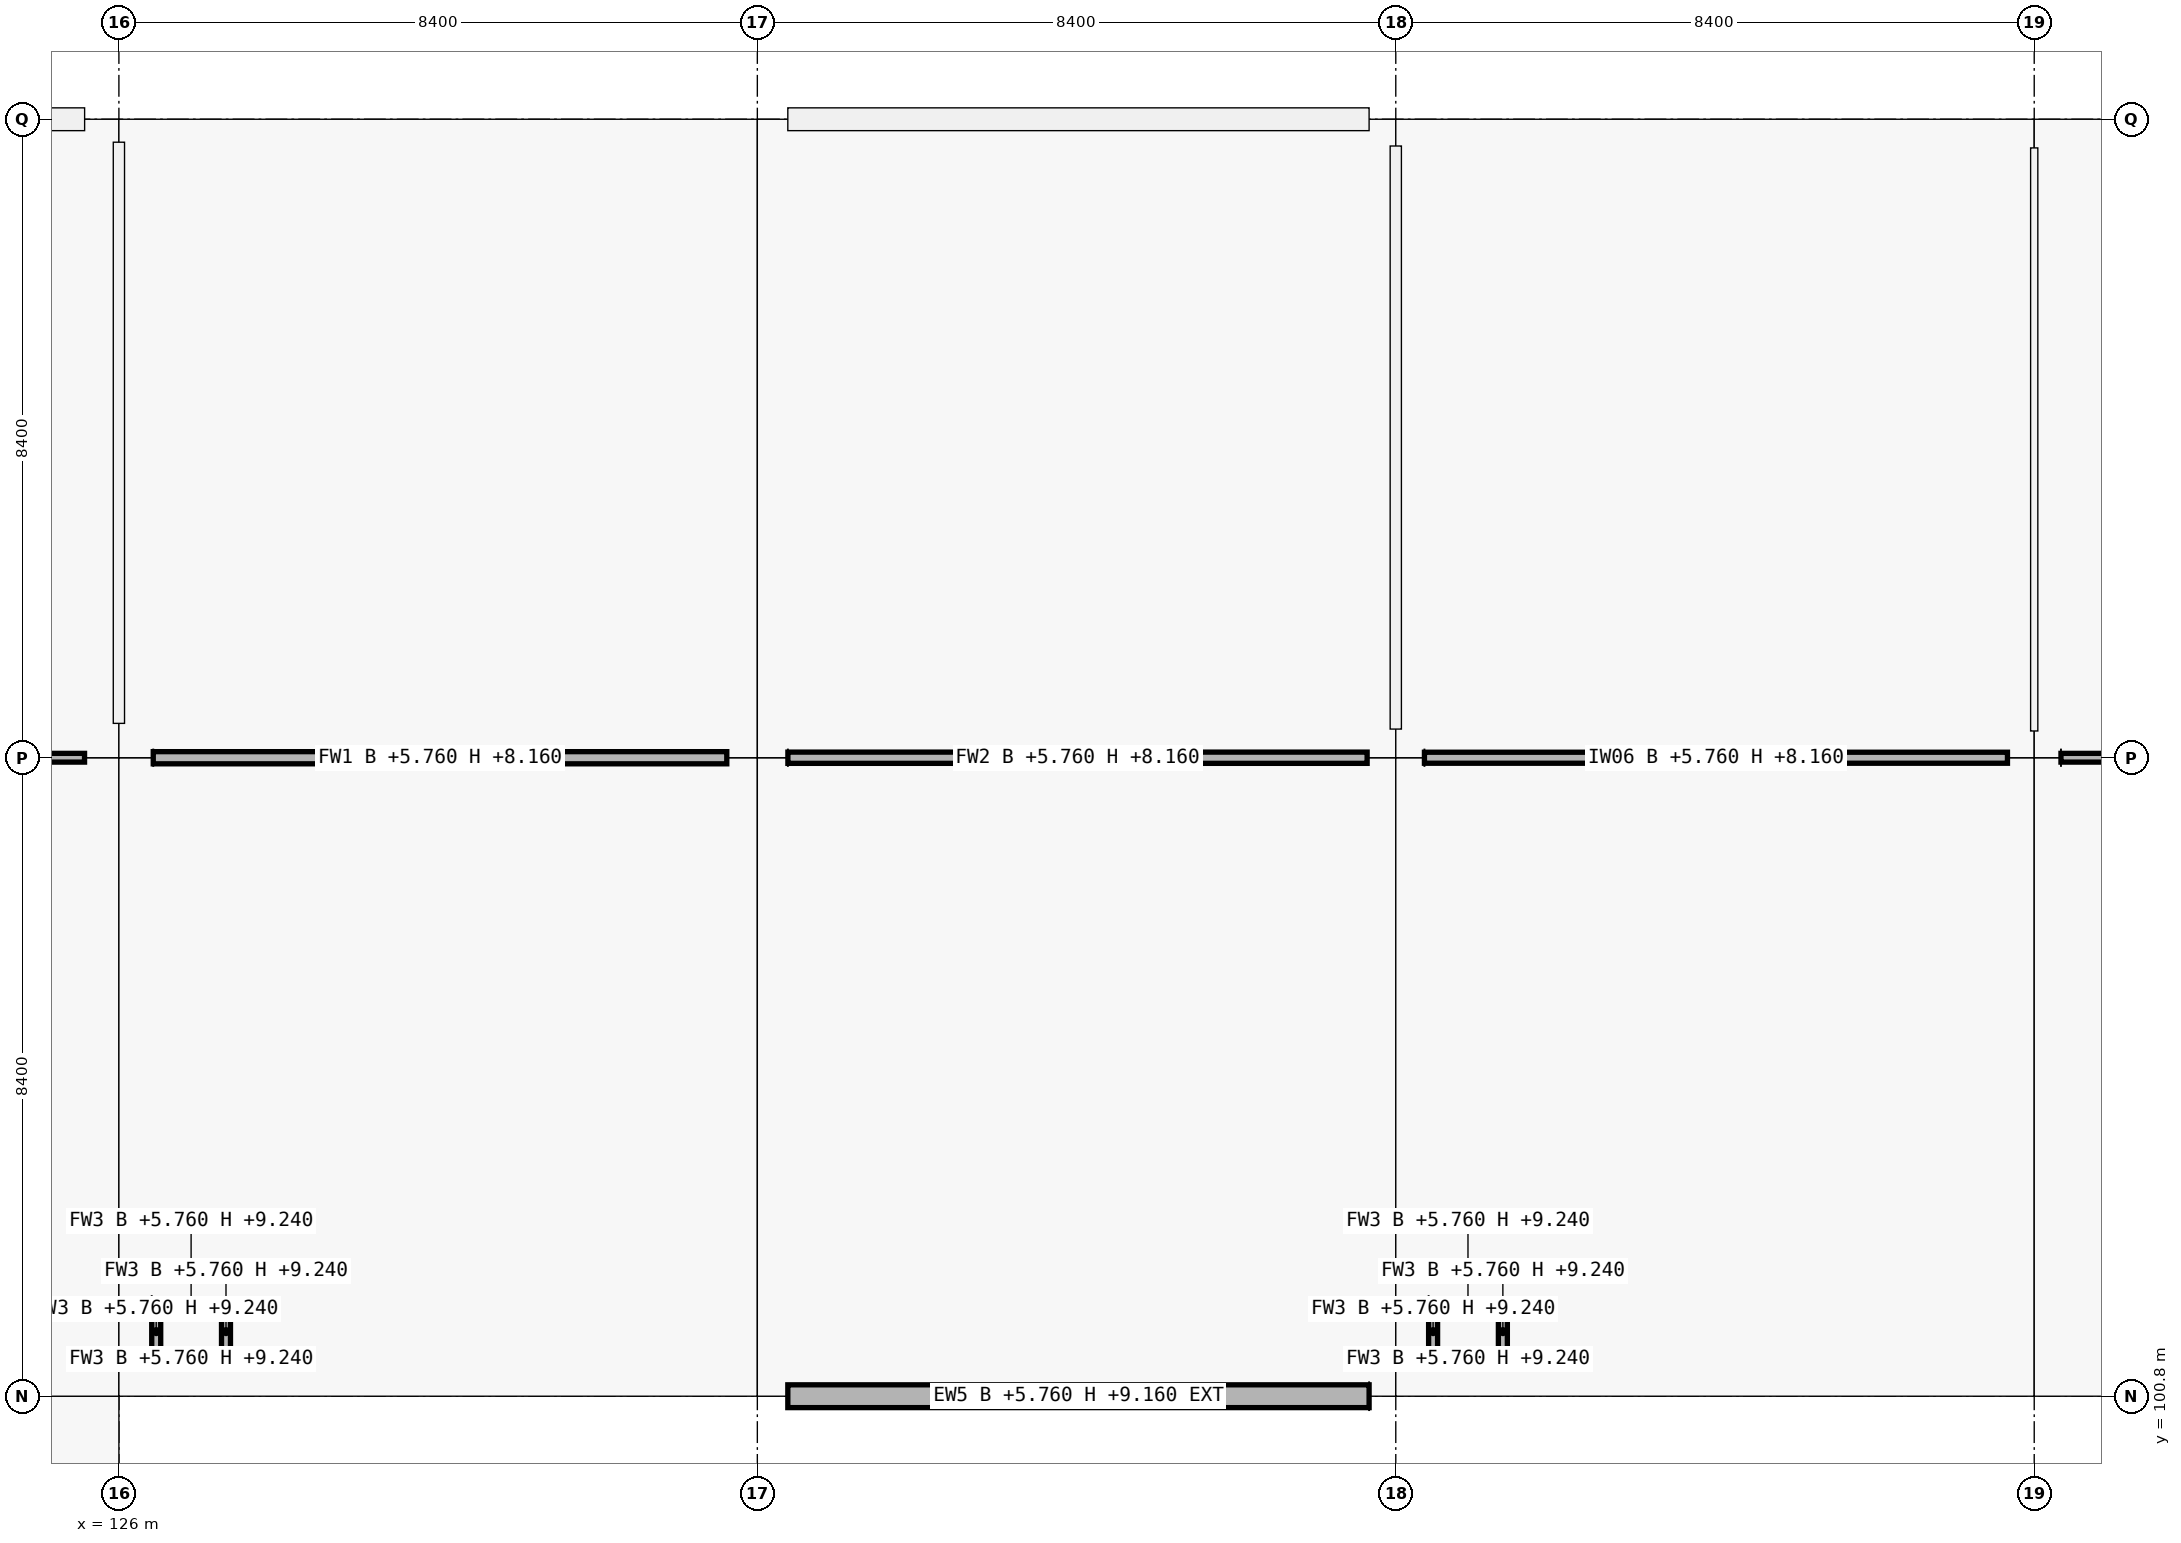
"""IFC4 building model, lengths in metres.
Left out: names, types, materials, properties, quantities, classifications, styles, units other than length and angle.
Written with IfcOpenShell. Run it as: python <this file> out.ifc"""

import sys

from ifc_helpers import new_model, si_unit, direction, frame, frame_2d, origin, origin_2d, place, context, subcontext, project, spatial, rectangle, extrude, element, fill, save


model = new_model("IFC4")
c1 = context("Model", 3, precision=1e-05, world=origin(), true_north=direction((0.0, 1.0)))
c2 = subcontext(c1, "Body", "Model", "MODEL_VIEW")
j1 = project(units=[si_unit("LENGTHUNIT", "METRE"), si_unit("PLANEANGLEUNIT", "RADIAN")], contexts=[c1])
p1 = place(None, origin())
s1 = spatial("IfcSite", under=j1, at=p1, CompositionType="ELEMENT")
p2 = place(p1, origin())
s2 = spatial("IfcBuilding", under=s1, at=p2, CompositionType="ELEMENT")
p3 = place(p2, frame((0.0, 0.0, 5.76)))
s3 = spatial("IfcBuildingStorey", under=s2, at=p3, CompositionType="ELEMENT", Elevation=5.76)
for number, where, z_axis, x_axis in (
    (1, (126.0, 100.8, 0.0), (0.0, 0.0, 1.0), (1.0, 0.0, 0.0)),
    (2, (126.0, 109.2, 0.0), (0.0, 0.0, 1.0), (1.0, 0.0, 0.0)),
):
    element("IfcColumn", number, at=place(p3, frame(where, z_axis=z_axis, x_axis=x_axis)), inside=s3, PredefinedType="COLUMN", context=c2, shape_type="SweptSolid", body=[
        extrude(rectangle(XDim=0.9, YDim=0.9, at=origin_2d()), origin(), (0.0, 0.0, 1.0), 4.5),
    ])
p4 = place(p3, frame((126.0, 117.6, 0.0), z_axis=(0.0, 0.0, 1.0), x_axis=(1.0, 0.0, 0.0)))
e3 = element("IfcColumn", 3, at=p4, inside=s3, PredefinedType="COLUMN", context=c2, shape_type="SweptSolid", body=[
    extrude(rectangle(XDim=0.9, YDim=0.6, at=origin_2d()), origin(), (0.0, 0.0, 1.0), 4.5),
])
for number, where, z_axis, x_axis in (
    (4, (134.4, 100.8, 0.0), (0.0, 0.0, 1.0), (1.0, 0.0, 0.0)),
    (5, (134.4, 109.2, 0.0), (0.0, 0.0, 1.0), (1.0, 0.0, 0.0)),
):
    element("IfcColumn", number, at=place(p3, frame(where, z_axis=z_axis, x_axis=x_axis)), inside=s3, PredefinedType="COLUMN", context=c2, shape_type="SweptSolid", body=[
        extrude(rectangle(XDim=0.8, YDim=0.8, at=origin_2d()), origin(), (0.0, 0.0, 1.0), 4.5),
    ])
p5 = place(p3, frame((134.4, 117.6, 0.0), z_axis=(0.0, 0.0, 1.0), x_axis=(1.0, 0.0, 0.0)))
e6 = element("IfcColumn", 6, at=p5, inside=s3, PredefinedType="COLUMN", context=c2, shape_type="SweptSolid", body=[
    extrude(rectangle(XDim=0.8, YDim=0.55, at=origin_2d()), origin(), (0.0, 0.0, 1.0), 4.5),
])
p6 = place(p3, frame((142.8, 100.8, 0.0), z_axis=(0.0, 0.0, 1.0), x_axis=(1.0, 0.0, 0.0)))
e7 = element("IfcColumn", 7, at=p6, inside=s3, PredefinedType="COLUMN", context=c2, shape_type="SweptSolid", body=[
    extrude(rectangle(XDim=0.7, YDim=0.7, at=origin_2d()), origin(), (0.0, 0.0, 1.0), 4.5),
])
p7 = place(p3, frame((142.8, 109.2, 0.0), z_axis=(0.0, 0.0, 1.0), x_axis=(1.0, 0.0, 0.0)))
e8 = element("IfcColumn", 8, at=p7, inside=s3, PredefinedType="COLUMN", context=c2, shape_type="SweptSolid", body=[
    extrude(rectangle(XDim=0.75, YDim=0.75, at=origin_2d()), origin(), (0.0, 0.0, 1.0), 4.5),
])
p8 = place(p3, frame((142.8, 117.6, 0.0), z_axis=(0.0, 0.0, 1.0), x_axis=(1.0, 0.0, 0.0)))
e9 = element("IfcColumn", 9, at=p8, inside=s3, PredefinedType="COLUMN", context=c2, shape_type="SweptSolid", body=[
    extrude(rectangle(XDim=0.7, YDim=0.7, at=origin_2d()), origin(), (0.0, 0.0, 1.0), 4.5),
])
p9 = place(p3, frame((151.2, 100.8, 0.0), z_axis=(0.0, 0.0, 1.0), x_axis=(1.0, 0.0, 0.0)))
e10 = element("IfcColumn", 10, at=p9, inside=s3, PredefinedType="COLUMN", context=c2, shape_type="SweptSolid", body=[
    extrude(rectangle(XDim=0.75, YDim=0.75, at=origin_2d()), origin(), (0.0, 0.0, 1.0), 4.5),
])
p10 = place(p3, frame((151.2, 109.2, 0.0), z_axis=(0.0, 0.0, 1.0), x_axis=(1.0, 0.0, 0.0)))
e11 = element("IfcColumn", 11, at=p10, inside=s3, PredefinedType="COLUMN", context=c2, shape_type="SweptSolid", body=[
    extrude(rectangle(XDim=0.7, YDim=0.7, at=origin_2d()), origin(), (0.0, 0.0, 1.0), 4.5),
])
p11 = place(p3, frame((151.2, 117.6, 0.0), z_axis=(0.0, 0.0, 1.0), x_axis=(1.0, 0.0, 0.0)))
e12 = element("IfcColumn", 12, at=p11, inside=s3, PredefinedType="COLUMN", context=c2, shape_type="SweptSolid", body=[
    extrude(rectangle(XDim=0.75, YDim=0.75, at=origin_2d()), origin(), (0.0, 0.0, 1.0), 4.5),
])
p12 = place(p3, frame((118.051, 117.6, 0.0), z_axis=(0.0, 0.0, 1.0), x_axis=(1.0, 0.0, 0.0)))
e13 = element("IfcWall", 13, at=p12, inside=s3, PredefinedType="SOLIDWALL", context=c2, shape_type="SweptSolid", body=[
    extrude(rectangle(XDim=7.498, YDim=0.3, at=frame_2d((3.749, 0.0))), origin(), (0.0, 0.0, 1.0), 3.4),
])
p13 = place(p12, frame((2.499, 0.0, 0.9)))
e14 = element("IfcOpeningElement", 14, at=p13, cuts=e13, PredefinedType="OPENING", context=c2, shape_type="SweptSolid", body=[
    extrude(rectangle(XDim=2.5, YDim=1.65, at=frame_2d((1.25, 0.825))), frame((0.0, 0.15, 0.0), z_axis=(0.0, -1.0, 0.0), x_axis=(1.0, 0.0, 0.0)), (0.0, 0.0, 1.0), 0.3),
])
p14 = place(p3, frame((142.449, 100.8, 0.0), z_axis=(0.0, 0.0, 1.0), x_axis=(-1.0, 0.0, 0.0)))
e15 = element("IfcWall", 15, at=p14, inside=s3, PredefinedType="SOLIDWALL", context=c2, shape_type="SweptSolid", body=[
    extrude(rectangle(XDim=7.648, YDim=0.3, at=frame_2d((3.824, 0.0))), origin(), (0.0, 0.0, 1.0), 3.4),
])
p15 = place(p14, frame((2.824, 0.0, 0.9)))
e16 = element("IfcOpeningElement", 16, at=p15, cuts=e15, PredefinedType="OPENING", context=c2, shape_type="SweptSolid", body=[
    extrude(rectangle(XDim=2.0, YDim=2.25, at=frame_2d((1.0, 1.125))), frame((0.0, 0.15, 0.0), z_axis=(0.0, -1.0, 0.0), x_axis=(1.0, 0.0, 0.0)), (0.0, 0.0, 1.0), 0.3),
])
p16 = place(p3, frame((134.801, 117.6, 0.0), z_axis=(0.0, 0.0, 1.0), x_axis=(1.0, 0.0, 0.0)))
e17 = element("IfcWall", 17, at=p16, inside=s3, PredefinedType="SOLIDWALL", context=c2, shape_type="SweptSolid", body=[
    extrude(rectangle(XDim=7.648, YDim=0.3, at=frame_2d((3.824, 0.0))), origin(), (0.0, 0.0, 1.0), 3.4),
])
p17 = place(p16, frame((3.024, 0.0, 0.9)))
e18 = element("IfcOpeningElement", 18, at=p17, cuts=e17, PredefinedType="OPENING", context=c2, shape_type="SweptSolid", body=[
    extrude(rectangle(XDim=1.6, YDim=2.25, at=frame_2d((0.8, 1.125))), frame((0.0, 0.15, 0.0), z_axis=(0.0, -1.0, 0.0), x_axis=(1.0, 0.0, 0.0)), (0.0, 0.0, 1.0), 0.3),
])
for number, where, z_axis, x_axis in (
    (19, (126.432, 101.291, 0.0), (0.0, 0.0, 1.0), (1.0, 0.0, 0.0)),
    (20, (126.432, 102.009, 0.0), (0.0, 0.0, 1.0), (1.0, 0.0, 0.0)),
):
    element("IfcWall", number, at=place(p3, frame(where, z_axis=z_axis, x_axis=x_axis)), inside=s3, PredefinedType="PARTITIONING", context=c2, shape_type="SweptSolid", body=[
        extrude(rectangle(XDim=1.036, YDim=0.118, at=frame_2d((0.518, 0.0))), origin(), (0.0, 0.0, 1.0), 3.48),
    ])
for number, where, z_axis, x_axis in (
    (21, (126.491, 101.35, 0.0), (0.0, 0.0, 1.0), (0.0, 1.0, 0.0)),
    (22, (127.409, 101.35, 0.0), (0.0, 0.0, 1.0), (0.0, 1.0, 0.0)),
):
    element("IfcWall", number, at=place(p3, frame(where, z_axis=z_axis, x_axis=x_axis)), inside=s3, PredefinedType="PARTITIONING", context=c2, shape_type="SweptSolid", body=[
        extrude(rectangle(XDim=0.6, YDim=0.118, at=frame_2d((0.3, 0.0))), origin(), (0.0, 0.0, 1.0), 3.48),
    ])
for number, where, z_axis, x_axis in (
    (23, (143.232, 101.291, 0.0), (0.0, 0.0, 1.0), (1.0, 0.0, 0.0)),
    (24, (143.232, 102.009, 0.0), (0.0, 0.0, 1.0), (1.0, 0.0, 0.0)),
):
    element("IfcWall", number, at=place(p3, frame(where, z_axis=z_axis, x_axis=x_axis)), inside=s3, PredefinedType="PARTITIONING", context=c2, shape_type="SweptSolid", body=[
        extrude(rectangle(XDim=1.036, YDim=0.118, at=frame_2d((0.518, 0.0))), origin(), (0.0, 0.0, 1.0), 3.48),
    ])
for number, where, z_axis, x_axis in (
    (25, (143.291, 101.35, 0.0), (0.0, 0.0, 1.0), (0.0, 1.0, 0.0)),
    (26, (144.209, 101.35, 0.0), (0.0, 0.0, 1.0), (0.0, 1.0, 0.0)),
):
    element("IfcWall", number, at=place(p3, frame(where, z_axis=z_axis, x_axis=x_axis)), inside=s3, PredefinedType="PARTITIONING", context=c2, shape_type="SweptSolid", body=[
        extrude(rectangle(XDim=0.6, YDim=0.118, at=frame_2d((0.3, 0.0))), origin(), (0.0, 0.0, 1.0), 3.48),
    ])
p18 = place(p3, frame((118.052, 109.2, 0.0), z_axis=(0.0, 0.0, 1.0), x_axis=(1.0, 0.0, 0.0)))
e27 = element("IfcWall", 27, at=p18, inside=s3, PredefinedType="PARTITIONING", context=c2, shape_type="SweptSolid", body=[
    extrude(rectangle(XDim=7.496, YDim=0.115, at=frame_2d((3.748, 0.0))), origin(), (0.0, 0.0, 1.0), 2.4),
])
p19 = place(p18, frame((3.248, 0.0, 0.0)))
e28 = element("IfcOpeningElement", 28, at=p19, cuts=e27, PredefinedType="OPENING", context=c2, shape_type="SweptSolid", body=[
    extrude(rectangle(XDim=1.0, YDim=2.2, at=frame_2d((0.5, 1.1))), frame((0.0, 0.058, 0.0), z_axis=(0.0, -1.0, 0.0), x_axis=(1.0, 0.0, 0.0)), (0.0, 0.0, 1.0), 0.115),
])
p20 = place(p3, frame((126.452, 109.2, 0.0), z_axis=(0.0, 0.0, 1.0), x_axis=(1.0, 0.0, 0.0)))
e29 = element("IfcWall", 29, at=p20, inside=s3, PredefinedType="PARTITIONING", context=c2, shape_type="SweptSolid", body=[
    extrude(rectangle(XDim=7.546, YDim=0.16, at=frame_2d((3.773, 0.0))), origin(), (0.0, 0.0, 1.0), 2.4),
])
p21 = place(p20, frame((3.323, 0.0, 0.0)))
e30 = element("IfcOpeningElement", 30, at=p21, cuts=e29, PredefinedType="OPENING", context=c2, shape_type="SweptSolid", body=[
    extrude(rectangle(XDim=0.9, YDim=2.05, at=frame_2d((0.45, 1.025))), frame((0.0, 0.08, 0.0), z_axis=(0.0, -1.0, 0.0), x_axis=(1.0, 0.0, 0.0)), (0.0, 0.0, 1.0), 0.16),
])
p22 = place(p3, frame((134.802, 109.2, 0.0), z_axis=(0.0, 0.0, 1.0), x_axis=(1.0, 0.0, 0.0)))
e31 = element("IfcWall", 31, at=p22, inside=s3, PredefinedType="PARTITIONING", context=c2, shape_type="SweptSolid", body=[
    extrude(rectangle(XDim=7.621, YDim=0.148, at=frame_2d((3.811, 0.0))), origin(), (0.0, 0.0, 1.0), 2.4),
])
p23 = place(p22, frame((3.011, 0.0, 0.0)))
e32 = element("IfcOpeningElement", 32, at=p23, cuts=e31, PredefinedType="OPENING", context=c2, shape_type="SweptSolid", body=[
    extrude(rectangle(XDim=1.6, YDim=2.2, at=frame_2d((0.8, 1.1))), frame((0.0, 0.074, 0.0), z_axis=(0.0, -1.0, 0.0), x_axis=(1.0, 0.0, 0.0)), (0.0, 0.0, 1.0), 0.148),
])
p24 = place(p3, frame((143.177, 109.2, 0.0), z_axis=(0.0, 0.0, 1.0), x_axis=(1.0, 0.0, 0.0)))
e33 = element("IfcWall", 33, at=p24, inside=s3, PredefinedType="PARTITIONING", context=c2, shape_type="SweptSolid", body=[
    extrude(rectangle(XDim=7.671, YDim=0.145, at=frame_2d((3.835, 0.0))), origin(), (0.0, 0.0, 1.0), 2.4),
])
p25 = place(p24, frame((3.376, 0.0, 0.0)))
e34 = element("IfcOpeningElement", 34, at=p25, cuts=e33, PredefinedType="OPENING", context=c2, shape_type="SweptSolid", body=[
    extrude(rectangle(XDim=0.92, YDim=2.15, at=frame_2d((0.46, 1.075))), frame((0.0, 0.073, 0.0), z_axis=(0.0, -1.0, 0.0), x_axis=(1.0, 0.0, 0.0)), (0.0, 0.0, 1.0), 0.145),
])
p26 = place(p3, frame((151.552, 109.2, 0.0), z_axis=(0.0, 0.0, 1.0), x_axis=(1.0, 0.0, 0.0)))
e35 = element("IfcWall", 35, at=p26, inside=s3, PredefinedType="PARTITIONING", context=c2, shape_type="SweptSolid", body=[
    extrude(rectangle(XDim=7.721, YDim=0.115, at=frame_2d((3.86, 0.0))), origin(), (0.0, 0.0, 1.0), 2.4),
])
p27 = place(p26, frame((3.336, 0.0, 0.0)))
e36 = element("IfcOpeningElement", 36, at=p27, cuts=e35, PredefinedType="OPENING", context=c2, shape_type="SweptSolid", body=[
    extrude(rectangle(XDim=1.05, YDim=2.12, at=frame_2d((0.525, 1.06))), frame((0.0, 0.058, 0.0), z_axis=(0.0, -1.0, 0.0), x_axis=(1.0, 0.0, 0.0)), (0.0, 0.0, 1.0), 0.115),
])
p28 = place(p3, frame((126.0, 109.652, 0.0), z_axis=(0.0, 0.0, 1.0), x_axis=(0.0, 1.0, 0.0)))
e37 = element("IfcWall", 37, at=p28, inside=s3, PredefinedType="PARTITIONING", context=c2, shape_type="SweptSolid", body=[
    extrude(rectangle(XDim=7.646, YDim=0.148, at=frame_2d((3.823, 0.0))), origin(), (0.0, 0.0, 1.0), 2.4),
])
p29 = place(p28, frame((3.248, 0.0, 0.0)))
e38 = element("IfcOpeningElement", 38, at=p29, cuts=e37, PredefinedType="OPENING", context=c2, shape_type="SweptSolid", body=[
    extrude(rectangle(XDim=1.15, YDim=2.2, at=frame_2d((0.575, 1.1))), frame((0.0, 0.074, 0.0), z_axis=(0.0, -1.0, 0.0), x_axis=(1.0, 0.0, 0.0)), (0.0, 0.0, 1.0), 0.148),
])
p30 = place(p3, frame((142.8, 109.577, 0.0), z_axis=(0.0, 0.0, 1.0), x_axis=(0.0, 1.0, 0.0)))
e39 = element("IfcWall", 39, at=p30, inside=s3, PredefinedType="PARTITIONING", context=c2, shape_type="SweptSolid", body=[
    extrude(rectangle(XDim=7.671, YDim=0.148, at=frame_2d((3.835, 0.0))), origin(), (0.0, 0.0, 1.0), 2.4),
])
p31 = place(p30, frame((3.285, 0.0, 0.0)))
e40 = element("IfcOpeningElement", 40, at=p31, cuts=e39, PredefinedType="OPENING", context=c2, shape_type="SweptSolid", body=[
    extrude(rectangle(XDim=1.1, YDim=2.15, at=frame_2d((0.55, 1.075))), frame((0.0, 0.074, 0.0), z_axis=(0.0, -1.0, 0.0), x_axis=(1.0, 0.0, 0.0)), (0.0, 0.0, 1.0), 0.148),
])
p32 = place(p3, frame((151.2, 109.552, 0.0), z_axis=(0.0, 0.0, 1.0), x_axis=(0.0, 1.0, 0.0)))
e41 = element("IfcWall", 41, at=p32, inside=s3, PredefinedType="PARTITIONING", context=c2, shape_type="SweptSolid", body=[
    extrude(rectangle(XDim=7.671, YDim=0.095, at=frame_2d((3.835, 0.0))), origin(), (0.0, 0.0, 1.0), 2.4),
])
p33 = place(p32, frame((3.371, 0.0, 0.0)))
e42 = element("IfcOpeningElement", 42, at=p33, cuts=e41, PredefinedType="OPENING", context=c2, shape_type="SweptSolid", body=[
    extrude(rectangle(XDim=0.93, YDim=2.12, at=frame_2d((0.465, 1.06))), frame((0.0, 0.047, 0.0), z_axis=(0.0, -1.0, 0.0), x_axis=(1.0, 0.0, 0.0)), (0.0, 0.0, 1.0), 0.095),
])
p34 = place(p15, origin())
e43 = element("IfcWindow", 43, at=p34, inside=s3, PartitioningType="SINGLE_PANEL", PredefinedType="WINDOW", context=c2, shape_type="SweptSolid", body=[
    extrude(rectangle(XDim=2.0, YDim=2.25, at=frame_2d((1.0, 1.125))), frame((0.0, 0.03, 0.0), z_axis=(0.0, -1.0, 0.0), x_axis=(1.0, 0.0, 0.0)), (0.0, 0.0, 1.0), 0.06),
])
fill(e16, e43)
p35 = place(p17, origin())
e44 = element("IfcWindow", 44, at=p35, inside=s3, PartitioningType="SINGLE_PANEL", PredefinedType="WINDOW", context=c2, shape_type="SweptSolid", body=[
    extrude(rectangle(XDim=1.6, YDim=2.25, at=frame_2d((0.8, 1.125))), frame((0.0, 0.03, 0.0), z_axis=(0.0, -1.0, 0.0), x_axis=(1.0, 0.0, 0.0)), (0.0, 0.0, 1.0), 0.06),
])
fill(e18, e44)
p36 = place(p21, origin())
e45 = element("IfcDoor", 45, at=p36, inside=s3, OperationType="SINGLE_SWING_LEFT", PredefinedType="DOOR", context=c2, shape_type="SweptSolid", body=[
    extrude(rectangle(XDim=0.9, YDim=2.05, at=frame_2d((0.45, 1.025))), frame((0.0, 0.025, 0.0), z_axis=(0.0, -1.0, 0.0), x_axis=(1.0, 0.0, 0.0)), (0.0, 0.0, 1.0), 0.05),
])
fill(e30, e45)
p37 = place(p23, origin())
e46 = element("IfcDoor", 46, at=p37, inside=s3, OperationType="DOUBLE_DOOR_SINGLE_SWING", PredefinedType="DOOR", context=c2, shape_type="SweptSolid", body=[
    extrude(rectangle(XDim=1.6, YDim=2.2, at=frame_2d((0.8, 1.1))), frame((0.0, 0.025, 0.0), z_axis=(0.0, -1.0, 0.0), x_axis=(1.0, 0.0, 0.0)), (0.0, 0.0, 1.0), 0.05),
])
fill(e32, e46)
p38 = place(p25, origin())
e47 = element("IfcDoor", 47, at=p38, inside=s3, OperationType="SINGLE_SWING_LEFT", PredefinedType="DOOR", context=c2, shape_type="SweptSolid", body=[
    extrude(rectangle(XDim=0.92, YDim=2.15, at=frame_2d((0.46, 1.075))), frame((0.0, 0.025, 0.0), z_axis=(0.0, -1.0, 0.0), x_axis=(1.0, 0.0, 0.0)), (0.0, 0.0, 1.0), 0.05),
])
fill(e34, e47)
p39 = place(p29, origin())
e48 = element("IfcDoor", 48, at=p39, inside=s3, OperationType="SINGLE_SWING_LEFT", PredefinedType="DOOR", context=c2, shape_type="SweptSolid", body=[
    extrude(rectangle(XDim=1.15, YDim=2.2, at=frame_2d((0.575, 1.1))), frame((0.0, 0.025, 0.0), z_axis=(0.0, -1.0, 0.0), x_axis=(1.0, 0.0, 0.0)), (0.0, 0.0, 1.0), 0.05),
])
fill(e38, e48)
p40 = place(p31, origin())
e49 = element("IfcDoor", 49, at=p40, inside=s3, OperationType="SINGLE_SWING_LEFT", PredefinedType="DOOR", context=c2, shape_type="SweptSolid", body=[
    extrude(rectangle(XDim=1.1, YDim=2.15, at=frame_2d((0.55, 1.075))), frame((0.0, 0.025, 0.0), z_axis=(0.0, -1.0, 0.0), x_axis=(1.0, 0.0, 0.0)), (0.0, 0.0, 1.0), 0.05),
])
fill(e40, e49)
p41 = place(p33, origin())
e50 = element("IfcDoor", 50, at=p41, inside=s3, OperationType="SINGLE_SWING_RIGHT", PredefinedType="DOOR", context=c2, shape_type="SweptSolid", body=[
    extrude(rectangle(XDim=0.93, YDim=2.12, at=frame_2d((0.465, 1.06))), frame((0.0, 0.025, 0.0), z_axis=(0.0, -1.0, 0.0), x_axis=(1.0, 0.0, 0.0)), (0.0, 0.0, 1.0), 0.05),
])
fill(e42, e50)
save(model, sys.argv[1])
